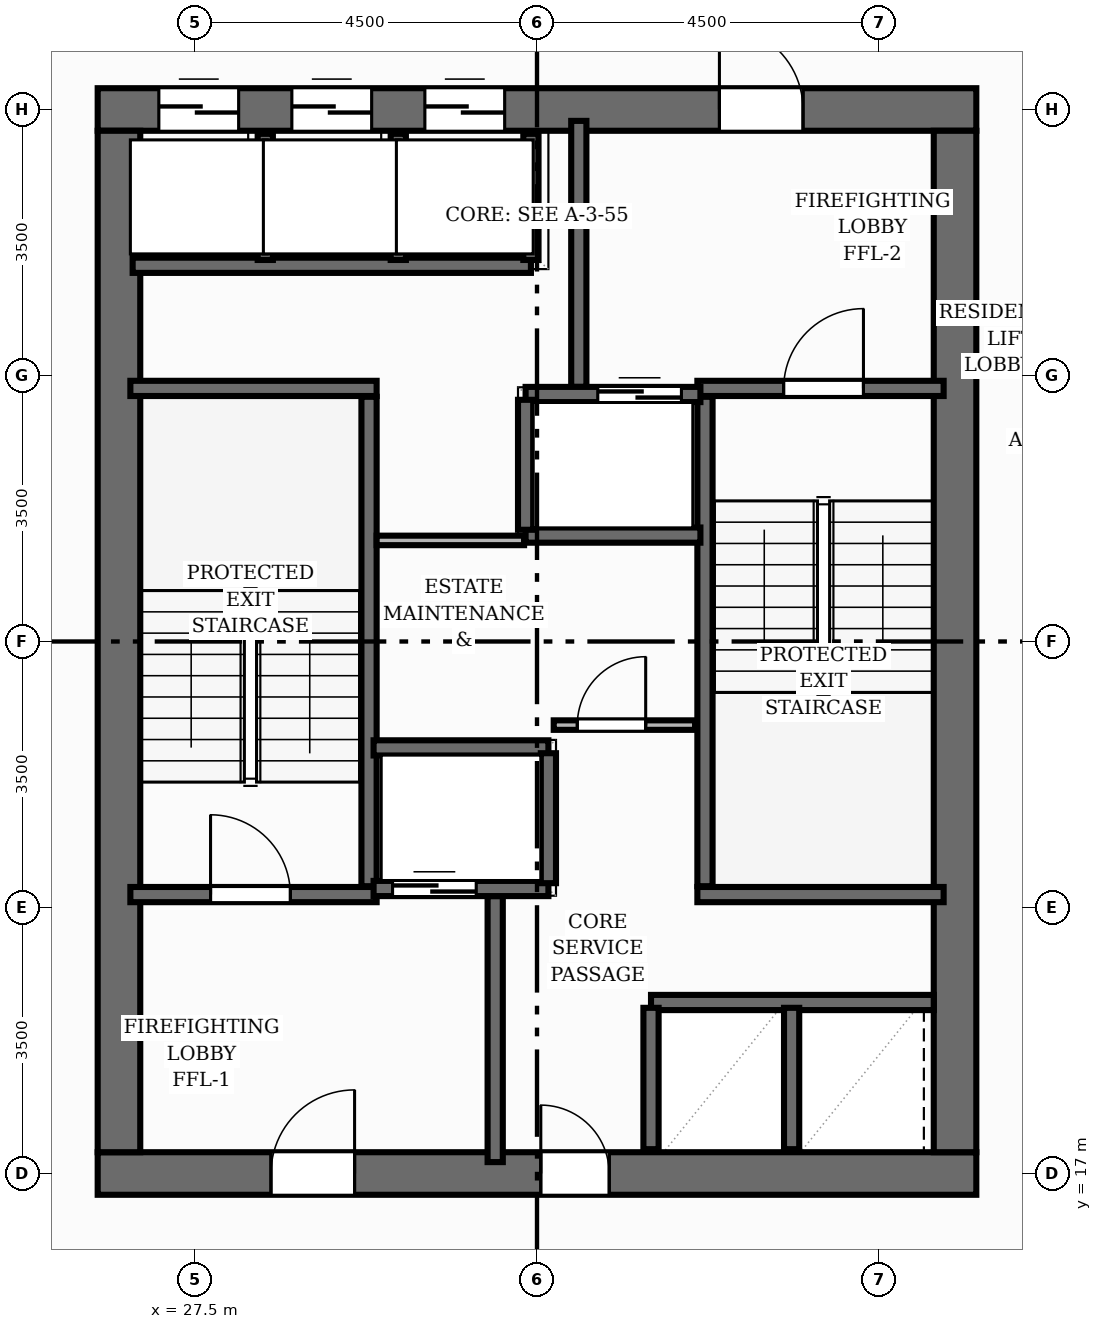
"""IFC4 building model, lengths in metres.
Left out: names, types, materials, properties, quantities, classifications, styles, units other than length and angle.
Written with IfcOpenShell. Run it as: python <this file> out.ifc"""

import sys

from ifc_helpers import new_model, si_unit, direction, frame, frame_2d, origin, place, context, subcontext, project, spatial, rectangle, extrude, element, fill, save


model = new_model("IFC4")
c1 = context("Model", 3, precision=1e-05, world=origin(), true_north=direction((0.0, 1.0)))
c2 = subcontext(c1, "Body", "Model", "MODEL_VIEW")
j1 = project(units=[si_unit("LENGTHUNIT", "METRE"), si_unit("PLANEANGLEUNIT", "RADIAN")], contexts=[c1])
p1 = place(None, origin())
s1 = spatial("IfcSite", under=j1, at=p1, CompositionType="ELEMENT")
p2 = place(p1, origin())
s2 = spatial("IfcBuilding", under=s1, at=p2, CompositionType="ELEMENT")
p3 = place(p2, frame((0.0, 0.0, 230.24)))
s3 = spatial("IfcBuildingStorey", under=s2, at=p3, CompositionType="ELEMENT", Elevation=230.24)
p4 = place(p3, frame((26.22, 17.0, 0.0), z_axis=(0.0, 0.0, 1.0), x_axis=(1.0, 0.0, 0.0)))
e1 = element("IfcWall", 1, at=p4, inside=s3, PredefinedType="SHEAR", context=c2, shape_type="SweptSolid", body=[
    extrude(rectangle(XDim=11.56, YDim=0.56, at=frame_2d((5.78, 0.0))), origin(), (0.0, 0.0, 1.0), 3.2),
])
p5 = place(p4, frame((2.28, 0.0, 0.0)))
e2 = element("IfcOpeningElement", 2, at=p5, cuts=e1, PredefinedType="OPENING", context=c2, shape_type="SweptSolid", body=[
    extrude(rectangle(XDim=1.1, YDim=2.15, at=frame_2d((0.55, 1.075))), frame((0.0, 0.29, 0.0), z_axis=(0.0, -1.0, 0.0), x_axis=(1.0, 0.0, 0.0)), (0.0, 0.0, 1.0), 0.58),
])
p6 = place(p4, frame((5.83, 0.0, 0.0)))
e3 = element("IfcOpeningElement", 3, at=p6, cuts=e1, PredefinedType="OPENING", context=c2, shape_type="SweptSolid", body=[
    extrude(rectangle(XDim=0.9, YDim=2.1, at=frame_2d((0.45, 1.05))), frame((0.0, 0.29, 0.0), z_axis=(0.0, -1.0, 0.0), x_axis=(1.0, 0.0, 0.0)), (0.0, 0.0, 1.0), 0.58),
])
p7 = place(p3, frame((26.22, 31.0, 0.0), z_axis=(0.0, 0.0, 1.0), x_axis=(1.0, 0.0, 0.0)))
e4 = element("IfcWall", 4, at=p7, inside=s3, PredefinedType="SHEAR", context=c2, shape_type="SweptSolid", body=[
    extrude(rectangle(XDim=11.56, YDim=0.56, at=frame_2d((5.78, 0.0))), origin(), (0.0, 0.0, 1.0), 3.2),
])
p8 = place(p7, frame((8.18, 0.0, 0.0)))
e5 = element("IfcOpeningElement", 5, at=p8, cuts=e4, PredefinedType="OPENING", context=c2, shape_type="SweptSolid", body=[
    extrude(rectangle(XDim=1.1, YDim=2.15, at=frame_2d((0.55, 1.075))), frame((0.0, 0.29, 0.0), z_axis=(0.0, -1.0, 0.0), x_axis=(1.0, 0.0, 0.0)), (0.0, 0.0, 1.0), 0.58),
])
p9 = place(p7, frame((0.805, 0.0, 0.0)))
e6 = element("IfcOpeningElement", 6, at=p9, cuts=e4, PredefinedType="OPENING", context=c2, shape_type="SweptSolid", body=[
    extrude(rectangle(XDim=1.05, YDim=2.15, at=frame_2d((0.525, 1.075))), frame((0.0, 0.29, 0.0), z_axis=(0.0, -1.0, 0.0), x_axis=(1.0, 0.0, 0.0)), (0.0, 0.0, 1.0), 0.58),
])
p10 = place(p7, frame((2.555, 0.0, 0.0)))
e7 = element("IfcOpeningElement", 7, at=p10, cuts=e4, PredefinedType="OPENING", context=c2, shape_type="SweptSolid", body=[
    extrude(rectangle(XDim=1.05, YDim=2.15, at=frame_2d((0.525, 1.075))), frame((0.0, 0.29, 0.0), z_axis=(0.0, -1.0, 0.0), x_axis=(1.0, 0.0, 0.0)), (0.0, 0.0, 1.0), 0.58),
])
p11 = place(p7, frame((4.305, 0.0, 0.0)))
e8 = element("IfcOpeningElement", 8, at=p11, cuts=e4, PredefinedType="OPENING", context=c2, shape_type="SweptSolid", body=[
    extrude(rectangle(XDim=1.05, YDim=2.15, at=frame_2d((0.525, 1.075))), frame((0.0, 0.29, 0.0), z_axis=(0.0, -1.0, 0.0), x_axis=(1.0, 0.0, 0.0)), (0.0, 0.0, 1.0), 0.58),
])
for number, where, z_axis, x_axis in (
    (9, (26.5, 17.28, 0.0), (0.0, 0.0, 1.0), (0.0, 1.0, 0.0)),
    (10, (37.5, 17.28, 0.0), (0.0, 0.0, 1.0), (0.0, 1.0, 0.0)),
):
    element("IfcWall", number, at=place(p3, frame(where, z_axis=z_axis, x_axis=x_axis)), inside=s3, PredefinedType="SHEAR", context=c2, shape_type="SweptSolid", body=[
        extrude(rectangle(XDim=13.44, YDim=0.56, at=frame_2d((6.72, 0.0))), origin(), (0.0, 0.0, 1.0), 3.2),
    ])
p12 = place(p3, frame((29.79, 20.78, 0.0), z_axis=(0.0, 0.0, 1.0), x_axis=(0.0, 1.0, 0.0)))
e11 = element("IfcWall", 11, at=p12, inside=s3, PredefinedType="SHEAR", context=c2, shape_type="SweptSolid", body=[
    extrude(rectangle(XDim=6.44, YDim=0.2, at=frame_2d((3.22, 0.0))), origin(), (0.0, 0.0, 1.0), 3.2),
])
p13 = place(p3, frame((26.65, 27.33, 0.0), z_axis=(0.0, 0.0, 1.0), x_axis=(1.0, 0.0, 0.0)))
e12 = element("IfcWall", 12, at=p13, inside=s3, PredefinedType="SHEAR", context=c2, shape_type="SweptSolid", body=[
    extrude(rectangle(XDim=3.24, YDim=0.2, at=frame_2d((1.62, 0.0))), origin(), (0.0, 0.0, 1.0), 3.2),
])
p14 = place(p3, frame((26.65, 20.67, 0.0), z_axis=(0.0, 0.0, 1.0), x_axis=(1.0, 0.0, 0.0)))
e13 = element("IfcWall", 13, at=p14, inside=s3, PredefinedType="SHEAR", context=c2, shape_type="SweptSolid", body=[
    extrude(rectangle(XDim=3.24, YDim=0.2, at=frame_2d((1.62, 0.0))), origin(), (0.0, 0.0, 1.0), 3.2),
])
p15 = place(p14, frame((1.055, 0.0, 0.0)))
e14 = element("IfcOpeningElement", 14, at=p15, cuts=e13, PredefinedType="OPENING", context=c2, shape_type="SweptSolid", body=[
    extrude(rectangle(XDim=1.05, YDim=2.15, at=frame_2d((0.525, 1.075))), frame((0.0, 0.11, 0.0), z_axis=(0.0, -1.0, 0.0), x_axis=(1.0, 0.0, 0.0)), (0.0, 0.0, 1.0), 0.22),
])
p16 = place(p3, frame((34.21, 20.78, 0.0), z_axis=(0.0, 0.0, 1.0), x_axis=(0.0, 1.0, 0.0)))
e15 = element("IfcWall", 15, at=p16, inside=s3, PredefinedType="SHEAR", context=c2, shape_type="SweptSolid", body=[
    extrude(rectangle(XDim=6.44, YDim=0.2, at=frame_2d((3.22, 0.0))), origin(), (0.0, 0.0, 1.0), 3.2),
])
p17 = place(p3, frame((34.11, 20.67, 0.0), z_axis=(0.0, 0.0, 1.0), x_axis=(1.0, 0.0, 0.0)))
e16 = element("IfcWall", 16, at=p17, inside=s3, PredefinedType="SHEAR", context=c2, shape_type="SweptSolid", body=[
    extrude(rectangle(XDim=3.24, YDim=0.2, at=frame_2d((1.62, 0.0))), origin(), (0.0, 0.0, 1.0), 3.2),
])
p18 = place(p3, frame((34.11, 27.33, 0.0), z_axis=(0.0, 0.0, 1.0), x_axis=(1.0, 0.0, 0.0)))
e17 = element("IfcWall", 17, at=p18, inside=s3, PredefinedType="SHEAR", context=c2, shape_type="SweptSolid", body=[
    extrude(rectangle(XDim=3.24, YDim=0.2, at=frame_2d((1.62, 0.0))), origin(), (0.0, 0.0, 1.0), 3.2),
])
p19 = place(p18, frame((1.135, 0.0, 0.0)))
e18 = element("IfcOpeningElement", 18, at=p19, cuts=e17, PredefinedType="OPENING", context=c2, shape_type="SweptSolid", body=[
    extrude(rectangle(XDim=1.05, YDim=2.15, at=frame_2d((0.525, 1.075))), frame((0.0, 0.11, 0.0), z_axis=(0.0, -1.0, 0.0), x_axis=(1.0, 0.0, 0.0)), (0.0, 0.0, 1.0), 0.22),
])
for number, where, z_axis, x_axis in (
    (19, (31.45, 17.15, 0.0), (0.0, 0.0, 1.0), (0.0, 1.0, 0.0)),
    (20, (32.55, 27.35, 0.0), (0.0, 0.0, 1.0), (0.0, 1.0, 0.0)),
):
    element("IfcWall", number, at=place(p3, frame(where, z_axis=z_axis, x_axis=x_axis)), inside=s3, PredefinedType="SHEAR", context=c2, shape_type="SweptSolid", body=[
        extrude(rectangle(XDim=3.5, YDim=0.2, at=frame_2d((1.75, 0.0))), origin(), (0.0, 0.0, 1.0), 3.2),
    ])
p20 = place(p3, frame((29.85, 20.75, 0.0), z_axis=(0.0, 0.0, 1.0), x_axis=(1.0, 0.0, 0.0)))
e21 = element("IfcWall", 21, at=p20, inside=s3, PredefinedType="SHEAR", context=c2, shape_type="SweptSolid", body=[
    extrude(rectangle(XDim=2.3, YDim=0.2, at=frame_2d((1.15, 0.0))), origin(), (0.0, 0.0, 1.0), 3.2),
])
p21 = place(p20, frame((0.25, 0.0, 0.0)))
e22 = element("IfcOpeningElement", 22, at=p21, cuts=e21, PredefinedType="OPENING", context=c2, shape_type="SweptSolid", body=[
    extrude(rectangle(XDim=1.1, YDim=2.15, at=frame_2d((0.55, 1.075))), frame((0.0, 0.11, 0.0), z_axis=(0.0, -1.0, 0.0), x_axis=(1.0, 0.0, 0.0)), (0.0, 0.0, 1.0), 0.22),
])
p22 = place(p3, frame((29.85, 22.6, 0.0), z_axis=(0.0, 0.0, 1.0), x_axis=(1.0, 0.0, 0.0)))
e23 = element("IfcWall", 23, at=p22, inside=s3, PredefinedType="SHEAR", context=c2, shape_type="SweptSolid", body=[
    extrude(rectangle(XDim=2.3, YDim=0.2, at=frame_2d((1.15, 0.0))), origin(), (0.0, 0.0, 1.0), 3.2),
])
p23 = place(p3, frame((32.15, 20.82, 0.0), z_axis=(0.0, 0.0, 1.0), x_axis=(0.0, 1.0, 0.0)))
e24 = element("IfcWall", 24, at=p23, inside=s3, PredefinedType="SHEAR", context=c2, shape_type="SweptSolid", body=[
    extrude(rectangle(XDim=1.71, YDim=0.2, at=frame_2d((0.855, 0.0))), origin(), (0.0, 0.0, 1.0), 3.2),
])
p24 = place(p3, frame((31.85, 27.25, 0.0), z_axis=(0.0, 0.0, 1.0), x_axis=(1.0, 0.0, 0.0)))
e25 = element("IfcWall", 25, at=p24, inside=s3, PredefinedType="SHEAR", context=c2, shape_type="SweptSolid", body=[
    extrude(rectangle(XDim=2.3, YDim=0.2, at=frame_2d((1.15, 0.0))), origin(), (0.0, 0.0, 1.0), 3.2),
])
p25 = place(p24, frame((0.95, 0.0, 0.0)))
e26 = element("IfcOpeningElement", 26, at=p25, cuts=e25, PredefinedType="OPENING", context=c2, shape_type="SweptSolid", body=[
    extrude(rectangle(XDim=1.1, YDim=2.15, at=frame_2d((0.55, 1.075))), frame((0.0, 0.11, 0.0), z_axis=(0.0, -1.0, 0.0), x_axis=(1.0, 0.0, 0.0)), (0.0, 0.0, 1.0), 0.22),
])
p26 = place(p3, frame((31.85, 25.4, 0.0), z_axis=(0.0, 0.0, 1.0), x_axis=(1.0, 0.0, 0.0)))
e27 = element("IfcWall", 27, at=p26, inside=s3, PredefinedType="SHEAR", context=c2, shape_type="SweptSolid", body=[
    extrude(rectangle(XDim=2.3, YDim=0.2, at=frame_2d((1.15, 0.0))), origin(), (0.0, 0.0, 1.0), 3.2),
])
p27 = place(p3, frame((31.85, 25.47, 0.0), z_axis=(0.0, 0.0, 1.0), x_axis=(0.0, 1.0, 0.0)))
e28 = element("IfcWall", 28, at=p27, inside=s3, PredefinedType="SHEAR", context=c2, shape_type="SweptSolid", body=[
    extrude(rectangle(XDim=1.71, YDim=0.2, at=frame_2d((0.855, 0.0))), origin(), (0.0, 0.0, 1.0), 3.2),
])
p28 = place(p3, frame((26.68, 28.95, 0.0), z_axis=(0.0, 0.0, 1.0), x_axis=(1.0, 0.0, 0.0)))
e29 = element("IfcWall", 29, at=p28, inside=s3, PredefinedType="SHEAR", context=c2, shape_type="SweptSolid", body=[
    extrude(rectangle(XDim=5.24, YDim=0.2, at=frame_2d((2.62, 0.0))), origin(), (0.0, 0.0, 1.0), 3.2),
])
for number, where, z_axis, x_axis in (
    (30, (31.92, 29.02, 0.0), (0.0, 0.0, 1.0), (0.0, 1.0, 0.0)),
    (31, (28.425, 29.02, 0.0), (0.0, 0.0, 1.0), (0.0, 1.0, 0.0)),
    (32, (30.175, 29.02, 0.0), (0.0, 0.0, 1.0), (0.0, 1.0, 0.0)),
):
    element("IfcWall", number, at=place(p3, frame(where, z_axis=z_axis, x_axis=x_axis)), inside=s3, PredefinedType="SHEAR", context=c2, shape_type="SweptSolid", body=[
        extrude(rectangle(XDim=1.66, YDim=0.2, at=frame_2d((0.83, 0.0))), origin(), (0.0, 0.0, 1.0), 3.2),
    ])
p29 = place(p3, frame((33.5, 19.25, 0.0), z_axis=(0.0, 0.0, 1.0), x_axis=(1.0, 0.0, 0.0)))
e33 = element("IfcWall", 33, at=p29, inside=s3, PredefinedType="SHEAR", context=c2, shape_type="SweptSolid", body=[
    extrude(rectangle(XDim=3.72, YDim=0.2, at=frame_2d((1.86, 0.0))), origin(), (0.0, 0.0, 1.0), 3.2),
])
for number, where, z_axis, x_axis in (
    (34, (33.5, 17.32, 0.0), (0.0, 0.0, 1.0), (0.0, 1.0, 0.0)),
    (35, (35.35, 17.32, 0.0), (0.0, 0.0, 1.0), (0.0, 1.0, 0.0)),
):
    element("IfcWall", number, at=place(p3, frame(where, z_axis=z_axis, x_axis=x_axis)), inside=s3, PredefinedType="SHEAR", context=c2, shape_type="SweptSolid", body=[
        extrude(rectangle(XDim=1.86, YDim=0.2, at=frame_2d((0.93, 0.0))), origin(), (0.0, 0.0, 1.0), 3.2),
    ])
p30 = place(p3, frame((32.22, 22.9, 0.0), z_axis=(0.0, 0.0, 1.0), x_axis=(1.0, 0.0, 0.0)))
e36 = element("IfcWall", 36, at=p30, inside=s3, PredefinedType="PARTITIONING", context=c2, shape_type="SweptSolid", body=[
    extrude(rectangle(XDim=1.86, YDim=0.125, at=frame_2d((0.93, 0.0))), origin(), (0.0, 0.0, 1.0), 2.955),
])
p31 = place(p30, frame((0.31, 0.0, 0.0)))
e37 = element("IfcOpeningElement", 37, at=p31, cuts=e36, PredefinedType="OPENING", context=c2, shape_type="SweptSolid", body=[
    extrude(rectangle(XDim=0.9, YDim=2.1, at=frame_2d((0.45, 1.05))), frame((0.0, 0.073, 0.0), z_axis=(0.0, -1.0, 0.0), x_axis=(1.0, 0.0, 0.0)), (0.0, 0.0, 1.0), 0.145),
])
p32 = place(p3, frame((29.89, 25.33, 0.0), z_axis=(0.0, 0.0, 1.0), x_axis=(1.0, 0.0, 0.0)))
e38 = element("IfcWall", 38, at=p32, inside=s3, PredefinedType="PARTITIONING", context=c2, shape_type="SweptSolid", body=[
    extrude(rectangle(XDim=1.94, YDim=0.125, at=frame_2d((0.97, 0.0))), origin(), (0.0, 0.0, 1.0), 2.955),
])
p33 = place(p15, origin())
e39 = element("IfcDoor", 39, at=p33, inside=s3, OperationType="SINGLE_SWING_LEFT", PredefinedType="DOOR", context=c2, shape_type="SweptSolid", body=[
    extrude(rectangle(XDim=1.05, YDim=2.15, at=frame_2d((0.525, 1.075))), frame((0.0, 0.025, 0.0), z_axis=(0.0, -1.0, 0.0), x_axis=(1.0, 0.0, 0.0)), (0.0, 0.0, 1.0), 0.05),
])
fill(e14, e39)
p34 = place(p19, origin())
e40 = element("IfcDoor", 40, at=p34, inside=s3, OperationType="SINGLE_SWING_RIGHT", PredefinedType="DOOR", context=c2, shape_type="SweptSolid", body=[
    extrude(rectangle(XDim=1.05, YDim=2.15, at=frame_2d((0.525, 1.075))), frame((0.0, 0.025, 0.0), z_axis=(0.0, -1.0, 0.0), x_axis=(1.0, 0.0, 0.0)), (0.0, 0.0, 1.0), 0.05),
])
fill(e18, e40)
p35 = place(p5, origin())
e41 = element("IfcDoor", 41, at=p35, inside=s3, OperationType="SINGLE_SWING_RIGHT", PredefinedType="DOOR", context=c2, shape_type="SweptSolid", body=[
    extrude(rectangle(XDim=1.1, YDim=2.15, at=frame_2d((0.55, 1.075))), frame((0.0, 0.025, 0.0), z_axis=(0.0, -1.0, 0.0), x_axis=(1.0, 0.0, 0.0)), (0.0, 0.0, 1.0), 0.05),
])
fill(e2, e41)
p36 = place(p8, origin())
e42 = element("IfcDoor", 42, at=p36, inside=s3, OperationType="SINGLE_SWING_LEFT", PredefinedType="DOOR", context=c2, shape_type="SweptSolid", body=[
    extrude(rectangle(XDim=1.1, YDim=2.15, at=frame_2d((0.55, 1.075))), frame((0.0, 0.025, 0.0), z_axis=(0.0, -1.0, 0.0), x_axis=(1.0, 0.0, 0.0)), (0.0, 0.0, 1.0), 0.05),
])
fill(e5, e42)
p37 = place(p21, origin())
e43 = element("IfcDoor", 43, at=p37, inside=s3, OperationType="DOUBLE_DOOR_SLIDING", PredefinedType="DOOR", context=c2, shape_type="SweptSolid", body=[
    extrude(rectangle(XDim=1.1, YDim=2.15, at=frame_2d((0.55, 1.075))), frame((0.0, 0.025, 0.0), z_axis=(0.0, -1.0, 0.0), x_axis=(1.0, 0.0, 0.0)), (0.0, 0.0, 1.0), 0.05),
])
fill(e22, e43)
p38 = place(p25, origin())
e44 = element("IfcDoor", 44, at=p38, inside=s3, OperationType="DOUBLE_DOOR_SLIDING", PredefinedType="DOOR", context=c2, shape_type="SweptSolid", body=[
    extrude(rectangle(XDim=1.1, YDim=2.15, at=frame_2d((0.55, 1.075))), frame((0.0, 0.025, 0.0), z_axis=(0.0, -1.0, 0.0), x_axis=(1.0, 0.0, 0.0)), (0.0, 0.0, 1.0), 0.05),
])
fill(e26, e44)
p39 = place(p9, origin())
e45 = element("IfcDoor", 45, at=p39, inside=s3, OperationType="DOUBLE_DOOR_SLIDING", PredefinedType="DOOR", context=c2, shape_type="SweptSolid", body=[
    extrude(rectangle(XDim=1.05, YDim=2.15, at=frame_2d((0.525, 1.075))), frame((0.0, 0.025, 0.0), z_axis=(0.0, -1.0, 0.0), x_axis=(1.0, 0.0, 0.0)), (0.0, 0.0, 1.0), 0.05),
])
fill(e6, e45)
p40 = place(p10, origin())
e46 = element("IfcDoor", 46, at=p40, inside=s3, OperationType="DOUBLE_DOOR_SLIDING", PredefinedType="DOOR", context=c2, shape_type="SweptSolid", body=[
    extrude(rectangle(XDim=1.05, YDim=2.15, at=frame_2d((0.525, 1.075))), frame((0.0, 0.025, 0.0), z_axis=(0.0, -1.0, 0.0), x_axis=(1.0, 0.0, 0.0)), (0.0, 0.0, 1.0), 0.05),
])
fill(e7, e46)
p41 = place(p11, origin())
e47 = element("IfcDoor", 47, at=p41, inside=s3, OperationType="DOUBLE_DOOR_SLIDING", PredefinedType="DOOR", context=c2, shape_type="SweptSolid", body=[
    extrude(rectangle(XDim=1.05, YDim=2.15, at=frame_2d((0.525, 1.075))), frame((0.0, 0.025, 0.0), z_axis=(0.0, -1.0, 0.0), x_axis=(1.0, 0.0, 0.0)), (0.0, 0.0, 1.0), 0.05),
])
fill(e8, e47)
p42 = place(p6, origin())
e48 = element("IfcDoor", 48, at=p42, inside=s3, OperationType="SINGLE_SWING_LEFT", PredefinedType="DOOR", context=c2, shape_type="SweptSolid", body=[
    extrude(rectangle(XDim=0.9, YDim=2.1, at=frame_2d((0.45, 1.05))), frame((0.0, 0.025, 0.0), z_axis=(0.0, -1.0, 0.0), x_axis=(1.0, 0.0, 0.0)), (0.0, 0.0, 1.0), 0.05),
])
fill(e3, e48)
p43 = place(p31, origin())
e49 = element("IfcDoor", 49, at=p43, inside=s3, OperationType="SINGLE_SWING_RIGHT", PredefinedType="DOOR", context=c2, shape_type="SweptSolid", body=[
    extrude(rectangle(XDim=0.9, YDim=2.1, at=frame_2d((0.45, 1.05))), frame((0.0, 0.025, 0.0), z_axis=(0.0, -1.0, 0.0), x_axis=(1.0, 0.0, 0.0)), (0.0, 0.0, 1.0), 0.05),
])
fill(e37, e49)
save(model, sys.argv[1])
